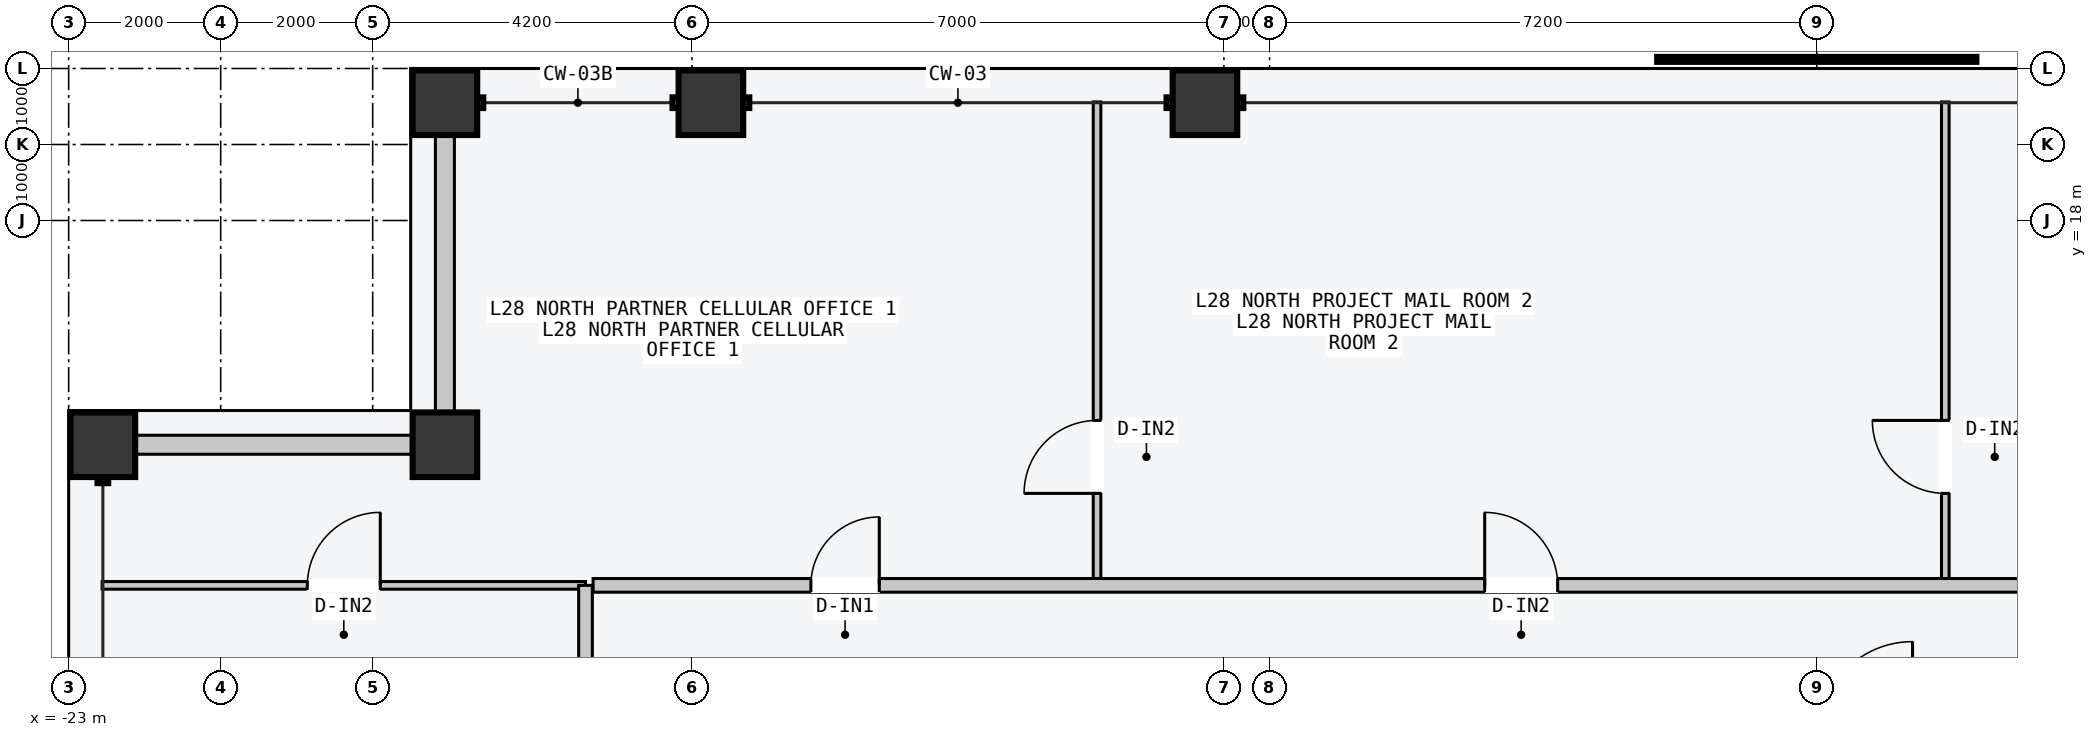
"""IFC4 building model, lengths in metres.
Left out: names, types, materials, properties, quantities, classifications, styles, units other than length and angle.
Written with IfcOpenShell. Run it as: python <this file> out.ifc"""

import sys

from ifc_helpers import new_model, si_unit, direction, frame, frame_2d, origin, origin_2d, place, context, subcontext, project, spatial, rectangle, hollow_rectangle, extrude, element, fill, save


model = new_model("IFC4")
c1 = context("Model", 3, precision=1e-05, world=origin(), true_north=direction((0.0, 1.0)))
c2 = subcontext(c1, "Body", "Model", "MODEL_VIEW")
j1 = project(units=[si_unit("LENGTHUNIT", "METRE"), si_unit("PLANEANGLEUNIT", "RADIAN")], contexts=[c1])
p1 = place(None, origin())
s1 = spatial("IfcSite", under=j1, at=p1, CompositionType="ELEMENT")
p2 = place(p1, origin())
s2 = spatial("IfcBuilding", under=s1, at=p2, CompositionType="ELEMENT")
p3 = place(p2, frame((0.0, 0.0, 109.8)))
s3 = spatial("IfcBuildingStorey", under=s2, at=p3, CompositionType="ELEMENT", Elevation=109.8)
for number, where, z_axis, x_axis in (
    (1, (-18.05, 19.55, 0.0), (0.0, 0.0, 1.0), (1.0, 0.0, 0.0)),
    (2, (-14.55, 19.55, 0.0), (0.0, 0.0, 1.0), (1.0, 0.0, 0.0)),
    (3, (-8.05, 19.55, 0.0), (0.0, 0.0, 1.0), (1.0, 0.0, 0.0)),
    (4, (-22.55, 15.05, 0.0), (0.0, 0.0, 1.0), (0.0, 1.0, 0.0)),
    (5, (-18.05, 15.05, 0.0), (0.0, 0.0, 1.0), (1.0, 0.0, 0.0)),
):
    element("IfcColumn", number, at=place(p3, frame(where, z_axis=z_axis, x_axis=x_axis)), inside=s3, PredefinedType="COLUMN", context=c2, shape_type="SweptSolid", body=[
        extrude(hollow_rectangle(XDim=0.85, YDim=0.85, WallThickness=0.04, at=origin_2d()), origin(), (0.0, 0.0, 1.0), 3.6),
    ])
for number, where, z_axis, x_axis in (
    (6, (-22.115, 15.05, 0.0), (0.0, 0.0, 1.0), (1.0, 0.0, 0.0)),
    (7, (-18.05, 15.485, 0.0), (0.0, 0.0, 1.0), (0.0, 1.0, 0.0)),
):
    element("IfcWall", number, at=place(p3, frame(where, z_axis=z_axis, x_axis=x_axis)), inside=s3, PredefinedType="STANDARD", context=c2, shape_type="SweptSolid", body=[
        extrude(rectangle(XDim=3.63, YDim=0.25, at=frame_2d((1.815, 0.0))), origin(), (0.0, 0.0, 1.0), 2.75),
    ])
p4 = place(p3, frame((-9.469, 13.26, 0.0), z_axis=(0.0, 0.0, 1.0), x_axis=(0.0, 1.0, 0.0)))
e8 = element("IfcWall", 8, at=p4, inside=s3, PredefinedType="PARTITIONING", context=c2, shape_type="SweptSolid", body=[
    extrude(rectangle(XDim=6.3, YDim=0.1, at=frame_2d((3.15, 0.0))), origin(), (0.0, 0.0, 1.0), 3.4),
])
p5 = place(p4, frame((1.15, 0.0, 0.0)))
e9 = element("IfcOpeningElement", 9, at=p5, cuts=e8, PredefinedType="OPENING", context=c2, shape_type="SweptSolid", body=[
    extrude(rectangle(XDim=0.96, YDim=2.18, at=frame_2d((0.48, 1.09))), frame((0.0, 0.06, 0.0), z_axis=(0.0, -1.0, 0.0), x_axis=(1.0, 0.0, 0.0)), (0.0, 0.0, 1.0), 0.12),
])
p6 = place(p3, frame((1.691, 13.26, 0.0), z_axis=(0.0, 0.0, 1.0), x_axis=(0.0, 1.0, 0.0)))
e10 = element("IfcWall", 10, at=p6, inside=s3, PredefinedType="PARTITIONING", context=c2, shape_type="SweptSolid", body=[
    extrude(rectangle(XDim=6.3, YDim=0.1, at=frame_2d((3.15, 0.0))), origin(), (0.0, 0.0, 1.0), 3.4),
])
p7 = place(p6, frame((1.15, 0.0, 0.0)))
e11 = element("IfcOpeningElement", 11, at=p7, cuts=e10, PredefinedType="OPENING", context=c2, shape_type="SweptSolid", body=[
    extrude(rectangle(XDim=0.96, YDim=2.18, at=frame_2d((0.48, 1.09))), frame((0.0, 0.06, 0.0), z_axis=(0.0, -1.0, 0.0), x_axis=(1.0, 0.0, 0.0)), (0.0, 0.0, 1.0), 0.12),
])
p8 = place(p3, frame((-16.1, 13.2, 0.0), z_axis=(0.0, 0.0, 1.0), x_axis=(1.0, 0.0, 0.0)))
e12 = element("IfcWall", 12, at=p8, inside=s3, PredefinedType="PARTITIONING", context=c2, shape_type="SweptSolid", body=[
    extrude(rectangle(XDim=32.2, YDim=0.18, at=frame_2d((16.1, 0.0))), origin(), (0.0, 0.0, 1.0), 3.4),
])
p9 = place(p8, frame((2.865, 0.0, 0.0)))
e13 = element("IfcOpeningElement", 13, at=p9, cuts=e12, PredefinedType="OPENING", context=c2, shape_type="SweptSolid", body=[
    extrude(rectangle(XDim=0.9, YDim=2.15, at=frame_2d((0.45, 1.075))), frame((0.0, 0.1, 0.0), z_axis=(0.0, -1.0, 0.0), x_axis=(1.0, 0.0, 0.0)), (0.0, 0.0, 1.0), 0.2),
])
p10 = place(p8, frame((11.731, 0.0, 0.0)))
e14 = element("IfcOpeningElement", 14, at=p10, cuts=e12, PredefinedType="OPENING", context=c2, shape_type="SweptSolid", body=[
    extrude(rectangle(XDim=0.96, YDim=2.18, at=frame_2d((0.48, 1.09))), frame((0.0, 0.1, 0.0), z_axis=(0.0, -1.0, 0.0), x_axis=(1.0, 0.0, 0.0)), (0.0, 0.0, 1.0), 0.2),
])
p11 = place(p8, frame((20.832, 0.0, 0.0)))
e15 = element("IfcOpeningElement", 15, at=p11, cuts=e12, PredefinedType="OPENING", context=c2, shape_type="SweptSolid", body=[
    extrude(rectangle(XDim=1.02, YDim=2.2, at=frame_2d((0.51, 1.1))), frame((0.0, 0.1, 0.0), z_axis=(0.0, -1.0, 0.0), x_axis=(1.0, 0.0, 0.0)), (0.0, 0.0, 1.0), 0.2),
])
p12 = place(p8, frame((28.017, 0.0, 0.0)))
e16 = element("IfcOpeningElement", 16, at=p12, cuts=e12, PredefinedType="OPENING", context=c2, shape_type="SweptSolid", body=[
    extrude(rectangle(XDim=1.06, YDim=2.2, at=frame_2d((0.53, 1.1))), frame((0.0, 0.1, 0.0), z_axis=(0.0, -1.0, 0.0), x_axis=(1.0, 0.0, 0.0)), (0.0, 0.0, 1.0), 0.2),
])
p13 = place(p3, frame((-22.56, 13.2, 0.0), z_axis=(0.0, 0.0, 1.0), x_axis=(1.0, 0.0, 0.0)))
e17 = element("IfcWall", 17, at=p13, inside=s3, PredefinedType="PARTITIONING", context=c2, shape_type="SweptSolid", body=[
    extrude(rectangle(XDim=6.36, YDim=0.1, at=frame_2d((3.18, 0.0))), origin(), (0.0, 0.0, 1.0), 3.4),
])
p14 = place(p13, frame((2.7, 0.0, 0.0)))
e18 = element("IfcOpeningElement", 18, at=p14, cuts=e17, PredefinedType="OPENING", context=c2, shape_type="SweptSolid", body=[
    extrude(rectangle(XDim=0.96, YDim=2.18, at=frame_2d((0.48, 1.09))), frame((0.0, 0.06, 0.0), z_axis=(0.0, -1.0, 0.0), x_axis=(1.0, 0.0, 0.0)), (0.0, 0.0, 1.0), 0.12),
])
p15 = place(p3, frame((-16.2, 11.25, 0.0), z_axis=(0.0, 0.0, 1.0), x_axis=(0.0, 1.0, 0.0)))
e19 = element("IfcWall", 19, at=p15, inside=s3, PredefinedType="PARTITIONING", context=c2, shape_type="SweptSolid", body=[
    extrude(rectangle(XDim=1.95, YDim=0.18, at=frame_2d((0.975, 0.0))), origin(), (0.0, 0.0, 1.0), 3.4),
])
p16 = place(p5, origin())
e20 = element("IfcDoor", 20, at=p16, inside=s3, OperationType="SINGLE_SWING_LEFT", PredefinedType="DOOR", context=c2, shape_type="SweptSolid", body=[
    extrude(rectangle(XDim=0.96, YDim=2.18, at=frame_2d((0.48, 1.09))), frame((0.0, 0.025, 0.0), z_axis=(0.0, -1.0, 0.0), x_axis=(1.0, 0.0, 0.0)), (0.0, 0.0, 1.0), 0.05),
])
fill(e9, e20)
p17 = place(p7, origin())
e21 = element("IfcDoor", 21, at=p17, inside=s3, OperationType="SINGLE_SWING_RIGHT", PredefinedType="DOOR", context=c2, shape_type="SweptSolid", body=[
    extrude(rectangle(XDim=0.96, YDim=2.18, at=frame_2d((0.48, 1.09))), frame((0.0, 0.025, 0.0), z_axis=(0.0, -1.0, 0.0), x_axis=(1.0, 0.0, 0.0)), (0.0, 0.0, 1.0), 0.05),
])
fill(e11, e21)
p18 = place(p9, origin())
e22 = element("IfcDoor", 22, at=p18, inside=s3, OperationType="SINGLE_SWING_RIGHT", PredefinedType="DOOR", context=c2, shape_type="SweptSolid", body=[
    extrude(rectangle(XDim=0.9, YDim=2.15, at=frame_2d((0.45, 1.075))), frame((0.0, 0.025, 0.0), z_axis=(0.0, -1.0, 0.0), x_axis=(1.0, 0.0, 0.0)), (0.0, 0.0, 1.0), 0.05),
])
fill(e13, e22)
p19 = place(p10, origin())
e23 = element("IfcDoor", 23, at=p19, inside=s3, OperationType="SINGLE_SWING_LEFT", PredefinedType="DOOR", context=c2, shape_type="SweptSolid", body=[
    extrude(rectangle(XDim=0.96, YDim=2.18, at=frame_2d((0.48, 1.09))), frame((0.0, 0.025, 0.0), z_axis=(0.0, -1.0, 0.0), x_axis=(1.0, 0.0, 0.0)), (0.0, 0.0, 1.0), 0.05),
])
fill(e14, e23)
p20 = place(p14, origin())
e24 = element("IfcDoor", 24, at=p20, inside=s3, OperationType="SINGLE_SWING_RIGHT", PredefinedType="DOOR", context=c2, shape_type="SweptSolid", body=[
    extrude(rectangle(XDim=0.96, YDim=2.18, at=frame_2d((0.48, 1.09))), frame((0.0, 0.025, 0.0), z_axis=(0.0, -1.0, 0.0), x_axis=(1.0, 0.0, 0.0)), (0.0, 0.0, 1.0), 0.05),
])
fill(e18, e24)
save(model, sys.argv[1])
